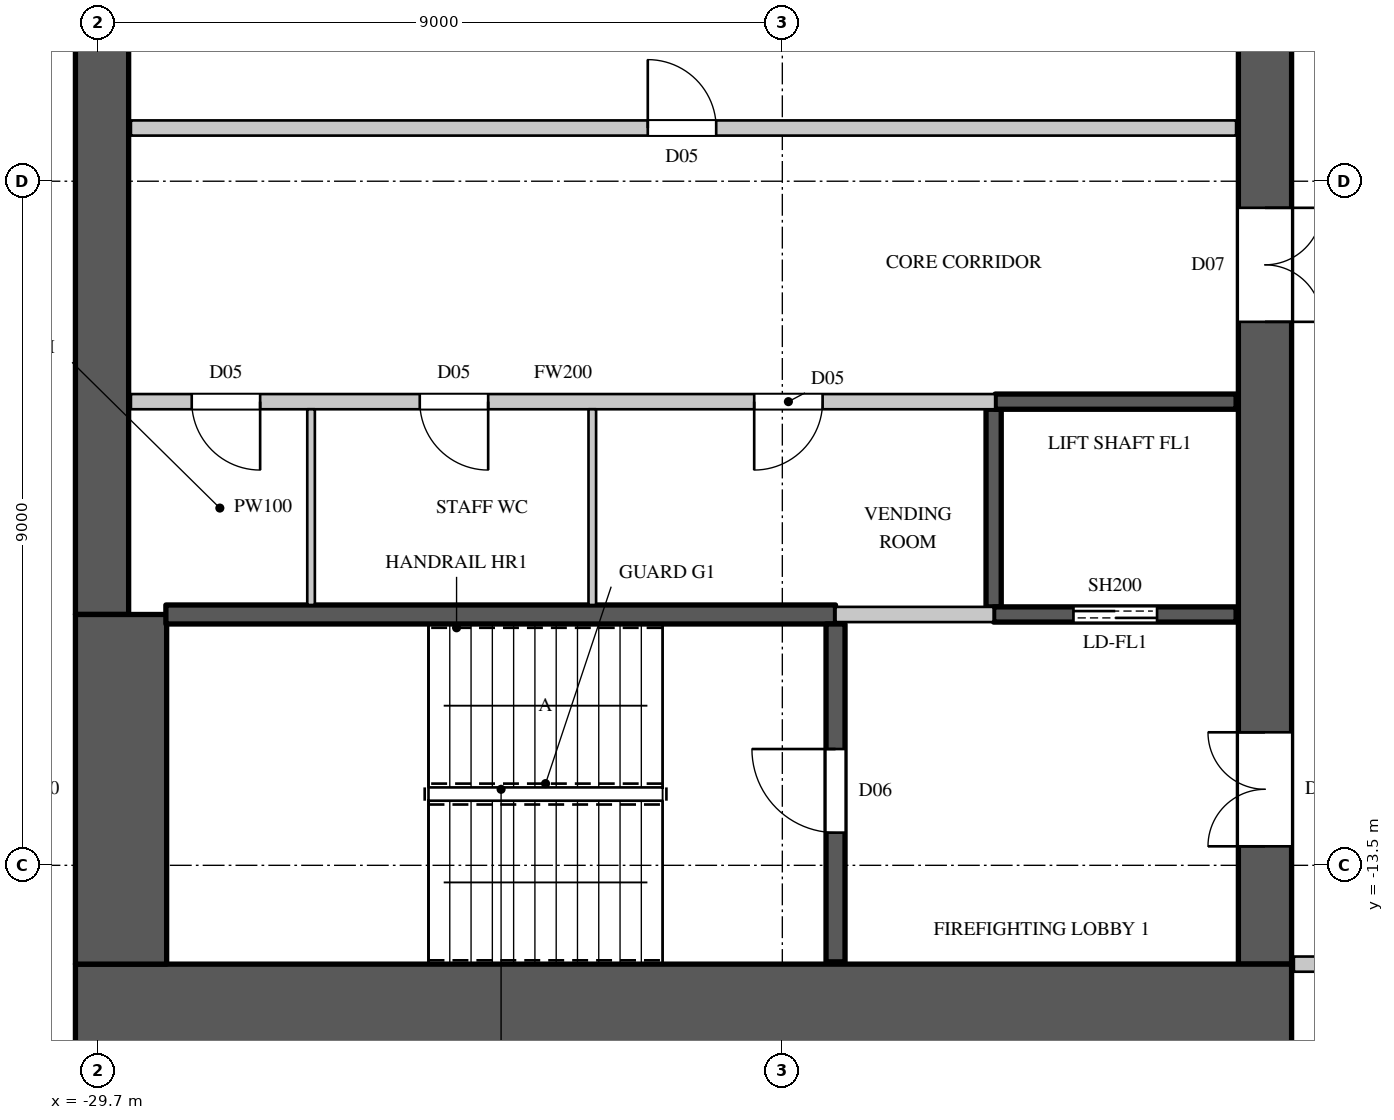
"""IFC4 building model, lengths in metres.
Left out: names, types, materials, properties, quantities, classifications, styles, units other than length and angle.
Written with IfcOpenShell. Run it as: python <this file> out.ifc"""

import sys

from ifc_helpers import new_model, si_unit, direction, frame, frame_2d, origin, place, context, subcontext, project, spatial, rectangle, extrude, element, fill, save


model = new_model("IFC4")
c1 = context("Model", 3, precision=1e-05, world=origin(), true_north=direction((0.0, 1.0)))
c2 = subcontext(c1, "Body", "Model", "MODEL_VIEW")
j1 = project(units=[si_unit("LENGTHUNIT", "METRE"), si_unit("PLANEANGLEUNIT", "RADIAN")], contexts=[c1])
p1 = place(None, origin())
s1 = spatial("IfcSite", under=j1, at=p1, CompositionType="ELEMENT")
p2 = place(p1, origin())
s2 = spatial("IfcBuilding", under=s1, at=p2, CompositionType="ELEMENT")
p3 = place(p2, frame((0.0, 0.0, 255.7)))
s3 = spatial("IfcBuildingStorey", under=s2, at=p3, CompositionType="ELEMENT", Elevation=255.7)
p4 = place(p3, frame((-30.0, -15.4, 0.0), z_axis=(0.0, 0.0, 1.0), x_axis=(1.0, 0.0, 0.0)))
e1 = element("IfcWall", 1, at=p4, inside=s3, PredefinedType="SHEAR", context=c2, shape_type="SweptSolid", body=[
    extrude(rectangle(XDim=16.0, YDim=1.2, at=frame_2d((8.0, 0.0))), origin(), (0.0, 0.0, 1.0), 4.1),
])
p5 = place(p3, frame((-14.35, -14.8, 0.0), z_axis=(0.0, 0.0, 1.0), x_axis=(0.0, 1.0, 0.0)))
e2 = element("IfcWall", 2, at=p5, inside=s3, PredefinedType="SHEAR", context=c2, shape_type="SweptSolid", body=[
    extrude(rectangle(XDim=29.6, YDim=0.7, at=frame_2d((14.8, 0.0))), origin(), (0.0, 0.0, 1.0), 4.1),
])
p6 = place(p5, frame((1.55, 0.0, 0.0)))
e3 = element("IfcOpeningElement", 3, at=p6, cuts=e2, PredefinedType="OPENING", context=c2, shape_type="SweptSolid", body=[
    extrude(rectangle(XDim=1.5, YDim=2.4, at=frame_2d((0.75, 1.2))), frame((0.0, 0.36, 0.0), z_axis=(0.0, -1.0, 0.0), x_axis=(1.0, 0.0, 0.0)), (0.0, 0.0, 1.0), 0.72),
])
p7 = place(p5, frame((26.55, 0.0, 0.0)))
e4 = element("IfcOpeningElement", 4, at=p7, cuts=e2, PredefinedType="OPENING", context=c2, shape_type="SweptSolid", body=[
    extrude(rectangle(XDim=1.5, YDim=2.4, at=frame_2d((0.75, 1.2))), frame((0.0, 0.36, 0.0), z_axis=(0.0, -1.0, 0.0), x_axis=(1.0, 0.0, 0.0)), (0.0, 0.0, 1.0), 0.72),
])
p8 = place(p5, frame((8.45, 0.0, 0.0)))
e5 = element("IfcOpeningElement", 5, at=p8, cuts=e2, PredefinedType="OPENING", context=c2, shape_type="SweptSolid", body=[
    extrude(rectangle(XDim=1.5, YDim=2.4, at=frame_2d((0.75, 1.2))), frame((0.0, 0.36, 0.0), z_axis=(0.0, -1.0, 0.0), x_axis=(1.0, 0.0, 0.0)), (0.0, 0.0, 1.0), 0.72),
])
p9 = place(p5, frame((19.65, 0.0, 0.0)))
e6 = element("IfcOpeningElement", 6, at=p9, cuts=e2, PredefinedType="OPENING", context=c2, shape_type="SweptSolid", body=[
    extrude(rectangle(XDim=1.5, YDim=2.4, at=frame_2d((0.75, 1.2))), frame((0.0, 0.36, 0.0), z_axis=(0.0, -1.0, 0.0), x_axis=(1.0, 0.0, 0.0)), (0.0, 0.0, 1.0), 0.72),
])
p10 = place(p5, frame((14.5, 0.0, 0.0)))
e7 = element("IfcOpeningElement", 7, at=p10, cuts=e2, PredefinedType="OPENING", context=c2, shape_type="SweptSolid", body=[
    extrude(rectangle(XDim=0.6, YDim=2.0, at=frame_2d((0.3, 1.0))), frame((0.0, 0.36, 0.0), z_axis=(0.0, -1.0, 0.0), x_axis=(1.0, 0.0, 0.0)), (0.0, 0.0, 1.0), 0.72),
])
p11 = place(p3, frame((-29.65, -10.2, 0.0), z_axis=(0.0, 0.0, 1.0), x_axis=(0.0, 1.0, 0.0)))
e8 = element("IfcWall", 8, at=p11, inside=s3, PredefinedType="SHEAR", context=c2, shape_type="SweptSolid", body=[
    extrude(rectangle(XDim=20.4, YDim=0.7, at=frame_2d((10.2, 0.0))), origin(), (0.0, 0.0, 1.0), 4.1),
])
p12 = place(p3, frame((-29.4, -14.8, 0.0), z_axis=(0.0, 0.0, 1.0), x_axis=(0.0, 1.0, 0.0)))
e9 = element("IfcWall", 9, at=p12, inside=s3, PredefinedType="SHEAR", context=c2, shape_type="SweptSolid", body=[
    extrude(rectangle(XDim=4.6, YDim=1.2, at=frame_2d((2.3, 0.0))), origin(), (0.0, 0.0, 1.0), 4.1),
])
p13 = place(p3, frame((-29.27, -7.4, 0.0), z_axis=(0.0, 0.0, 1.0), x_axis=(1.0, 0.0, 0.0)))
e10 = element("IfcWall", 10, at=p13, inside=s3, PredefinedType="PARTITIONING", context=c2, shape_type="SweptSolid", body=[
    extrude(rectangle(XDim=11.37, YDim=0.2, at=frame_2d((5.685, 0.0))), origin(), (0.0, 0.0, 1.0), 3.8),
])
p14 = place(p13, frame((0.8, 0.0, 0.0)))
e11 = element("IfcOpeningElement", 11, at=p14, cuts=e10, PredefinedType="OPENING", context=c2, shape_type="SweptSolid", body=[
    extrude(rectangle(XDim=0.9, YDim=2.2, at=frame_2d((0.45, 1.1))), frame((0.0, 0.11, 0.0), z_axis=(0.0, -1.0, 0.0), x_axis=(1.0, 0.0, 0.0)), (0.0, 0.0, 1.0), 0.22),
])
p15 = place(p13, frame((3.8, 0.0, 0.0)))
e12 = element("IfcOpeningElement", 12, at=p15, cuts=e10, PredefinedType="OPENING", context=c2, shape_type="SweptSolid", body=[
    extrude(rectangle(XDim=0.9, YDim=2.2, at=frame_2d((0.45, 1.1))), frame((0.0, 0.11, 0.0), z_axis=(0.0, -1.0, 0.0), x_axis=(1.0, 0.0, 0.0)), (0.0, 0.0, 1.0), 0.22),
])
p16 = place(p13, frame((8.2, 0.0, 0.0)))
e13 = element("IfcOpeningElement", 13, at=p16, cuts=e10, PredefinedType="OPENING", context=c2, shape_type="SweptSolid", body=[
    extrude(rectangle(XDim=0.9, YDim=2.2, at=frame_2d((0.45, 1.1))), frame((0.0, 0.11, 0.0), z_axis=(0.0, -1.0, 0.0), x_axis=(1.0, 0.0, 0.0)), (0.0, 0.0, 1.0), 0.22),
])
p17 = place(p3, frame((-29.27, -3.8, 0.0), z_axis=(0.0, 0.0, 1.0), x_axis=(1.0, 0.0, 0.0)))
e14 = element("IfcWall", 14, at=p17, inside=s3, PredefinedType="PARTITIONING", context=c2, shape_type="SweptSolid", body=[
    extrude(rectangle(XDim=14.54, YDim=0.2, at=frame_2d((7.27, 0.0))), origin(), (0.0, 0.0, 1.0), 3.8),
])
p18 = place(p17, frame((6.8, 0.0, 0.0)))
e15 = element("IfcOpeningElement", 15, at=p18, cuts=e14, PredefinedType="OPENING", context=c2, shape_type="SweptSolid", body=[
    extrude(rectangle(XDim=0.9, YDim=2.2, at=frame_2d((0.45, 1.1))), frame((0.0, 0.11, 0.0), z_axis=(0.0, -1.0, 0.0), x_axis=(1.0, 0.0, 0.0)), (0.0, 0.0, 1.0), 0.22),
])
p19 = place(p3, frame((-20.0, -10.2, 0.0), z_axis=(0.0, 0.0, 1.0), x_axis=(1.0, 0.0, 0.0)))
e16 = element("IfcWall", 16, at=p19, inside=s3, PredefinedType="PARTITIONING", context=c2, shape_type="SweptSolid", body=[
    extrude(rectangle(XDim=2.08, YDim=0.2, at=frame_2d((1.04, 0.0))), origin(), (0.0, 0.0, 1.0), 3.8),
])
p20 = place(p3, frame((-13.97, -14.8, 0.0), z_axis=(0.0, 0.0, 1.0), x_axis=(1.0, 0.0, 0.0)))
e17 = element("IfcWall", 17, at=p20, inside=s3, PredefinedType="PARTITIONING", context=c2, shape_type="SweptSolid", body=[
    extrude(rectangle(XDim=2.87, YDim=0.2, at=frame_2d((1.435, 0.0))), origin(), (0.0, 0.0, 1.0), 3.8),
])
p21 = place(p3, frame((-17.92, -10.1, 0.0), z_axis=(0.0, 0.0, 1.0), x_axis=(0.0, 1.0, 0.0)))
e18 = element("IfcWall", 18, at=p21, inside=s3, PredefinedType="SHEAR", context=c2, shape_type="SweptSolid", body=[
    extrude(rectangle(XDim=2.6, YDim=0.2, at=frame_2d((1.3, 0.0))), origin(), (0.0, 0.0, 1.0), 3.8),
])
p22 = place(p3, frame((-17.92, -10.2, 0.0), z_axis=(0.0, 0.0, 1.0), x_axis=(1.0, 0.0, 0.0)))
e19 = element("IfcWall", 19, at=p22, inside=s3, PredefinedType="SHEAR", context=c2, shape_type="SweptSolid", body=[
    extrude(rectangle(XDim=3.19, YDim=0.2, at=frame_2d((1.595, 0.0))), origin(), (0.0, 0.0, 1.0), 3.8),
])
p23 = place(p22, frame((1.05, 0.0, 0.0)))
e20 = element("IfcOpeningElement", 20, at=p23, cuts=e19, PredefinedType="OPENING", context=c2, shape_type="SweptSolid", body=[
    extrude(rectangle(XDim=1.1, YDim=2.2, at=frame_2d((0.55, 1.1))), frame((0.0, 0.11, 0.0), z_axis=(0.0, -1.0, 0.0), x_axis=(1.0, 0.0, 0.0)), (0.0, 0.0, 1.0), 0.22),
])
p24 = place(p3, frame((-17.9, -7.4, 0.0), z_axis=(0.0, 0.0, 1.0), x_axis=(1.0, 0.0, 0.0)))
e21 = element("IfcWall", 21, at=p24, inside=s3, PredefinedType="SHEAR", context=c2, shape_type="SweptSolid", body=[
    extrude(rectangle(XDim=3.17, YDim=0.2, at=frame_2d((1.585, 0.0))), origin(), (0.0, 0.0, 1.0), 3.8),
])
p25 = place(p3, frame((-28.81, -10.2, 0.0), z_axis=(0.0, 0.0, 1.0), x_axis=(1.0, 0.0, 0.0)))
e22 = element("IfcWall", 22, at=p25, inside=s3, PredefinedType="SHEAR", context=c2, shape_type="SweptSolid", body=[
    extrude(rectangle(XDim=8.81, YDim=0.25, at=frame_2d((4.405, 0.0))), origin(), (0.0, 0.0, 1.0), 3.8),
])
p26 = place(p3, frame((-20.0, -14.77, 0.0), z_axis=(0.0, 0.0, 1.0), x_axis=(0.0, 1.0, 0.0)))
e23 = element("IfcWall", 23, at=p26, inside=s3, PredefinedType="SHEAR", context=c2, shape_type="SweptSolid", body=[
    extrude(rectangle(XDim=4.445, YDim=0.25, at=frame_2d((2.223, 0.0))), origin(), (0.0, 0.0, 1.0), 3.8),
])
p27 = place(p26, frame((1.7, 0.0, 0.0)))
e24 = element("IfcOpeningElement", 24, at=p27, cuts=e23, PredefinedType="OPENING", context=c2, shape_type="SweptSolid", body=[
    extrude(rectangle(XDim=1.1, YDim=2.2, at=frame_2d((0.55, 1.1))), frame((0.0, 0.135, 0.0), z_axis=(0.0, -1.0, 0.0), x_axis=(1.0, 0.0, 0.0)), (0.0, 0.0, 1.0), 0.27),
])
for number, where, z_axis, x_axis in (
    (25, (-26.9, -10.075, 0.0), (0.0, 0.0, 1.0), (0.0, 1.0, 0.0)),
    (26, (-23.2, -10.075, 0.0), (0.0, 0.0, 1.0), (0.0, 1.0, 0.0)),
):
    element("IfcWall", number, at=place(p3, frame(where, z_axis=z_axis, x_axis=x_axis)), inside=s3, PredefinedType="PARTITIONING", context=c2, shape_type="SweptSolid", body=[
        extrude(rectangle(XDim=2.575, YDim=0.1, at=frame_2d((1.288, 0.0))), origin(), (0.0, 0.0, 1.0), 3.8),
    ])
p28 = place(p27, origin())
e27 = element("IfcDoor", 27, at=p28, inside=s3, OperationType="SINGLE_SWING_RIGHT", PredefinedType="DOOR", context=c2, shape_type="SweptSolid", body=[
    extrude(rectangle(XDim=1.1, YDim=2.2, at=frame_2d((0.55, 1.1))), frame((0.0, 0.025, 0.0), z_axis=(0.0, -1.0, 0.0), x_axis=(1.0, 0.0, 0.0)), (0.0, 0.0, 1.0), 0.05),
])
fill(e24, e27)
p29 = place(p14, origin())
e28 = element("IfcDoor", 28, at=p29, inside=s3, OperationType="SINGLE_SWING_LEFT", PredefinedType="DOOR", context=c2, shape_type="SweptSolid", body=[
    extrude(rectangle(XDim=0.9, YDim=2.2, at=frame_2d((0.45, 1.1))), frame((0.0, 0.025, 0.0), z_axis=(0.0, -1.0, 0.0), x_axis=(1.0, 0.0, 0.0)), (0.0, 0.0, 1.0), 0.05),
])
fill(e11, e28)
p30 = place(p15, origin())
e29 = element("IfcDoor", 29, at=p30, inside=s3, OperationType="SINGLE_SWING_LEFT", PredefinedType="DOOR", context=c2, shape_type="SweptSolid", body=[
    extrude(rectangle(XDim=0.9, YDim=2.2, at=frame_2d((0.45, 1.1))), frame((0.0, 0.025, 0.0), z_axis=(0.0, -1.0, 0.0), x_axis=(1.0, 0.0, 0.0)), (0.0, 0.0, 1.0), 0.05),
])
fill(e12, e29)
p31 = place(p16, origin())
e30 = element("IfcDoor", 30, at=p31, inside=s3, OperationType="SINGLE_SWING_RIGHT", PredefinedType="DOOR", context=c2, shape_type="SweptSolid", body=[
    extrude(rectangle(XDim=0.9, YDim=2.2, at=frame_2d((0.45, 1.1))), frame((0.0, 0.025, 0.0), z_axis=(0.0, -1.0, 0.0), x_axis=(1.0, 0.0, 0.0)), (0.0, 0.0, 1.0), 0.05),
])
fill(e13, e30)
p32 = place(p18, origin())
e31 = element("IfcDoor", 31, at=p32, inside=s3, OperationType="SINGLE_SWING_LEFT", PredefinedType="DOOR", context=c2, shape_type="SweptSolid", body=[
    extrude(rectangle(XDim=0.9, YDim=2.2, at=frame_2d((0.45, 1.1))), frame((0.0, 0.025, 0.0), z_axis=(0.0, -1.0, 0.0), x_axis=(1.0, 0.0, 0.0)), (0.0, 0.0, 1.0), 0.05),
])
fill(e15, e31)
p33 = place(p23, origin())
e32 = element("IfcDoor", 32, at=p33, inside=s3, OperationType="DOUBLE_DOOR_SLIDING", PredefinedType="DOOR", context=c2, shape_type="SweptSolid", body=[
    extrude(rectangle(XDim=1.1, YDim=2.2, at=frame_2d((0.55, 1.1))), frame((0.0, 0.025, 0.0), z_axis=(0.0, -1.0, 0.0), x_axis=(1.0, 0.0, 0.0)), (0.0, 0.0, 1.0), 0.05),
])
fill(e20, e32)
p34 = place(p6, origin())
e33 = element("IfcDoor", 33, at=p34, inside=s3, OperationType="DOUBLE_DOOR_SINGLE_SWING", PredefinedType="DOOR", context=c2, shape_type="SweptSolid", body=[
    extrude(rectangle(XDim=1.5, YDim=2.4, at=frame_2d((0.75, 1.2))), frame((0.0, 0.345, 0.0), z_axis=(0.0, -1.0, 0.0), x_axis=(1.0, 0.0, 0.0)), (0.0, 0.0, 1.0), 0.05),
])
fill(e3, e33)
p35 = place(p8, origin())
e34 = element("IfcDoor", 34, at=p35, inside=s3, OperationType="DOUBLE_DOOR_SINGLE_SWING", PredefinedType="DOOR", context=c2, shape_type="SweptSolid", body=[
    extrude(rectangle(XDim=1.5, YDim=2.4, at=frame_2d((0.75, 1.2))), frame((0.0, -0.295, 0.0), z_axis=(0.0, -1.0, 0.0), x_axis=(1.0, 0.0, 0.0)), (0.0, 0.0, 1.0), 0.05),
])
fill(e5, e34)
save(model, sys.argv[1])
